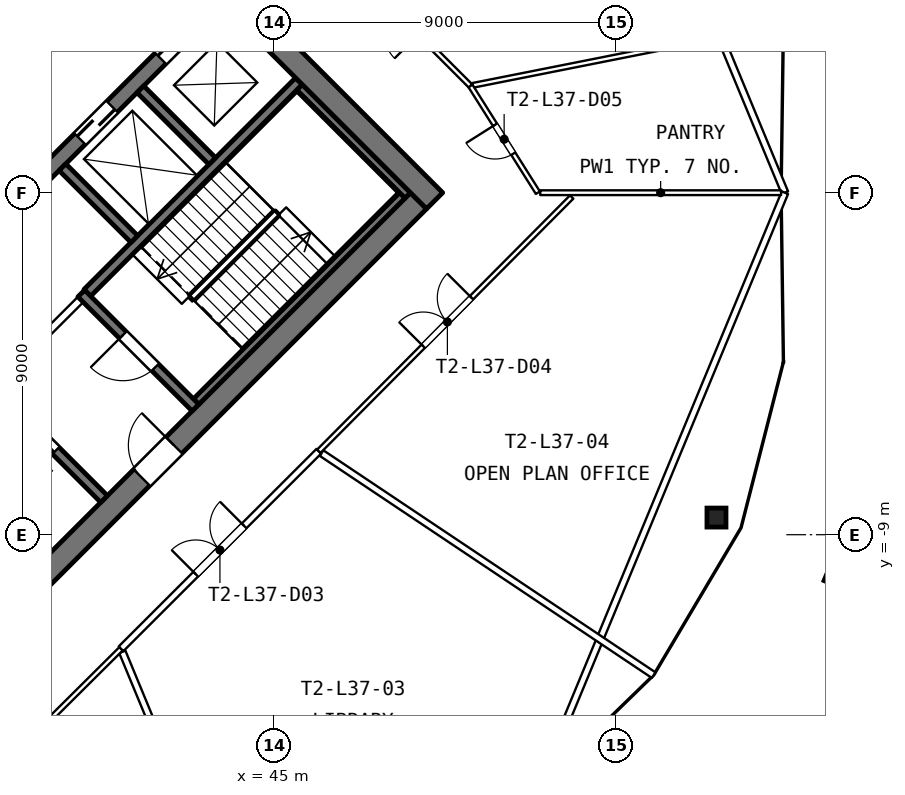
"""IFC4 building model, lengths in metres.
Left out: names, types, materials, properties, quantities, classifications, styles, units other than length and angle.
Written with IfcOpenShell. Run it as: python <this file> out.ifc"""

import sys

from ifc_helpers import new_model, si_unit, direction, frame, frame_2d, origin, origin_2d, place, context, subcontext, project, spatial, rectangle, hollow_rectangle, extrude, element, fill, save


model = new_model("IFC4")
c1 = context("Model", 3, precision=1e-05, world=origin(), true_north=direction((0.0, 1.0)))
c2 = subcontext(c1, "Body", "Model", "MODEL_VIEW")
j1 = project(units=[si_unit("LENGTHUNIT", "METRE"), si_unit("PLANEANGLEUNIT", "RADIAN")], contexts=[c1])
p1 = place(None, origin())
s1 = spatial("IfcSite", under=j1, at=p1, CompositionType="ELEMENT")
p2 = place(p1, origin())
s2 = spatial("IfcBuilding", under=s1, at=p2, CompositionType="ELEMENT")
p3 = place(p2, frame((0.0, 0.0, 130.8)))
s3 = spatial("IfcBuildingStorey", under=s2, at=p3, CompositionType="ELEMENT", Elevation=130.8)
p4 = place(p3, frame((60.575, -10.179, 0.0), z_axis=(-0.018778670571, 0.007786476489, 0.999793344805), x_axis=(-0.707293864185, -0.706876840783, -0.007779566259)))
e1 = element("IfcColumn", 1, at=p4, inside=s3, PredefinedType="COLUMN", context=c2, shape_type="SweptSolid", body=[
    extrude(hollow_rectangle(XDim=0.9, YDim=0.9, WallThickness=0.08, at=origin_2d()), origin(), (0.0, 0.0, 1.0), 30.006),
])
p5 = place(p2, frame((0.0, 0.0, 156.8)))
s4 = spatial("IfcBuildingStorey", under=s2, at=p5, CompositionType="ELEMENT", Elevation=156.8)
p6 = place(p5, frame((56.639, -8.549, 0.0), z_axis=(0.0, 0.0, 1.0), x_axis=(1.0, 0.0, 0.0)))
e2 = element("IfcColumn", 2, at=p6, inside=s4, PredefinedType="COLUMN", context=c2, shape_type="SweptSolid", body=[
    extrude(hollow_rectangle(XDim=0.5, YDim=0.5, WallThickness=0.03, at=origin_2d()), origin(), (0.0, 0.0, 1.0), 3.9),
])
p7 = place(p5, frame((36.212, -12.799, 0.0), z_axis=(0.0, 0.0, 1.0), x_axis=(0.707106781187, 0.707106781187, 0.0)))
e3 = element("IfcWall", 3, at=p7, inside=s4, PredefinedType="SHEAR", context=c2, shape_type="SweptSolid", body=[
    extrude(rectangle(XDim=17.8, YDim=0.6, at=frame_2d((8.9, 0.0))), origin(), (0.0, 0.0, 1.0), 3.7),
])
p8 = place(p7, frame((7.5, 0.0, 0.0)))
e4 = element("IfcOpeningElement", 4, at=p8, cuts=e3, PredefinedType="OPENING", context=c2, shape_type="SweptSolid", body=[
    extrude(rectangle(XDim=1.2, YDim=2.1, at=frame_2d((0.6, 1.05))), frame((0.0, 0.31, 0.0), z_axis=(0.0, -1.0, 0.0), x_axis=(1.0, 0.0, 0.0)), (0.0, 0.0, 1.0), 0.62),
])
p9 = place(p7, frame((0.5, 0.0, 0.0)))
e5 = element("IfcOpeningElement", 5, at=p9, cuts=e3, PredefinedType="OPENING", context=c2, shape_type="SweptSolid", body=[
    extrude(rectangle(XDim=0.9, YDim=2.1, at=frame_2d((0.45, 1.05))), frame((0.0, 0.31, 0.0), z_axis=(0.0, -1.0, 0.0), x_axis=(1.0, 0.0, 0.0)), (0.0, 0.0, 1.0), 0.62),
])
p10 = place(p7, frame((2.0, 0.0, 0.0)))
e6 = element("IfcOpeningElement", 6, at=p10, cuts=e3, PredefinedType="OPENING", context=c2, shape_type="SweptSolid", body=[
    extrude(rectangle(XDim=0.9, YDim=2.1, at=frame_2d((0.45, 1.05))), frame((0.0, 0.31, 0.0), z_axis=(0.0, -1.0, 0.0), x_axis=(1.0, 0.0, 0.0)), (0.0, 0.0, 1.0), 0.62),
])
p11 = place(p5, frame((42.947, -5.498, 0.0), z_axis=(0.0, 0.0, 1.0), x_axis=(0.707122685701, 0.707090876314, 0.0)))
e7 = element("IfcWall", 7, at=p11, inside=s4, PredefinedType="SHEAR", context=c2, shape_type="SweptSolid", body=[
    extrude(rectangle(XDim=7.675, YDim=0.2, at=frame_2d((3.837, 0.0))), origin(), (0.0, 0.0, 1.0), 3.7),
])
p12 = place(p5, frame((37.679, -5.038, 0.0), z_axis=(0.0, 0.0, 1.0), x_axis=(0.707106781187, 0.707106781187, 0.0)))
e8 = element("IfcWall", 8, at=p12, inside=s4, PredefinedType="PARTITIONING", context=c2, shape_type="SweptSolid", body=[
    extrude(rectangle(XDim=3.15, YDim=0.2, at=frame_2d((1.575, 0.0))), origin(), (0.0, 0.0, 1.0), 3.7),
])
p13 = place(p5, frame((40.083, -2.634, 0.0), z_axis=(0.0, 0.0, 1.0), x_axis=(0.707106781187, 0.707106781187, 0.0)))
e9 = element("IfcWall", 9, at=p13, inside=s4, PredefinedType="SHEAR", context=c2, shape_type="SweptSolid", body=[
    extrude(rectangle(XDim=7.875, YDim=0.25, at=frame_2d((3.938, 0.0))), origin(), (0.0, 0.0, 1.0), 3.7),
])
p14 = place(p5, frame((30.944, -7.531, 0.0), z_axis=(0.0, 0.0, 1.0), x_axis=(0.707106781187, 0.707106781187, 0.0)))
e10 = element("IfcWall", 10, at=p14, inside=s4, PredefinedType="SHEAR", context=c2, shape_type="SweptSolid", body=[
    extrude(rectangle(XDim=17.8, YDim=0.4, at=frame_2d((8.9, 0.0))), origin(), (0.0, 0.0, 1.0), 3.7),
])
p15 = place(p14, frame((12.65, 0.0, 0.0)))
e11 = element("IfcOpeningElement", 11, at=p15, cuts=e10, PredefinedType="OPENING", context=c2, shape_type="SweptSolid", body=[
    extrude(rectangle(XDim=1.2, YDim=2.1, at=frame_2d((0.6, 1.05))), frame((0.0, 0.21, 0.0), z_axis=(0.0, -1.0, 0.0), x_axis=(1.0, 0.0, 0.0)), (0.0, 0.0, 1.0), 0.42),
])
p16 = place(p14, frame((15.65, 0.0, 0.0)))
e12 = element("IfcOpeningElement", 12, at=p16, cuts=e10, PredefinedType="OPENING", context=c2, shape_type="SweptSolid", body=[
    extrude(rectangle(XDim=1.1, YDim=2.1, at=frame_2d((0.55, 1.05))), frame((0.0, 0.21, 0.0), z_axis=(0.0, -1.0, 0.0), x_axis=(1.0, 0.0, 0.0)), (0.0, 0.0, 1.0), 0.42),
])
p17 = place(p14, frame((2.45, 0.0, 0.0)))
e13 = element("IfcOpeningElement", 13, at=p17, cuts=e10, PredefinedType="OPENING", context=c2, shape_type="SweptSolid", body=[
    extrude(rectangle(XDim=1.0, YDim=2.1, at=frame_2d((0.5, 1.05))), frame((0.0, 0.21, 0.0), z_axis=(0.0, -1.0, 0.0), x_axis=(1.0, 0.0, 0.0)), (0.0, 0.0, 1.0), 0.42),
])
p18 = place(p14, frame((8.4, 0.0, 0.0)))
e14 = element("IfcOpeningElement", 14, at=p18, cuts=e10, PredefinedType="OPENING", context=c2, shape_type="SweptSolid", body=[
    extrude(rectangle(XDim=1.0, YDim=2.1, at=frame_2d((0.5, 1.05))), frame((0.0, 0.21, 0.0), z_axis=(0.0, -1.0, 0.0), x_axis=(1.0, 0.0, 0.0)), (0.0, 0.0, 1.0), 0.42),
])
p19 = place(p5, frame((28.469, -5.056, 0.0), z_axis=(0.0, 0.0, 1.0), x_axis=(0.707106781187, 0.707106781187, 0.0)))
e15 = element("IfcWall", 15, at=p19, inside=s4, PredefinedType="SHEAR", context=c2, shape_type="SweptSolid", body=[
    extrude(rectangle(XDim=17.8, YDim=0.4, at=frame_2d((8.9, 0.0))), origin(), (0.0, 0.0, 1.0), 3.7),
])
p20 = place(p19, frame((0.4, 0.0, 0.0)))
e16 = element("IfcOpeningElement", 16, at=p20, cuts=e15, PredefinedType="OPENING", context=c2, shape_type="SweptSolid", body=[
    extrude(rectangle(XDim=1.0, YDim=2.1, at=frame_2d((0.5, 1.05))), frame((0.0, 0.21, 0.0), z_axis=(0.0, -1.0, 0.0), x_axis=(1.0, 0.0, 0.0)), (0.0, 0.0, 1.0), 0.42),
])
p21 = place(p19, frame((2.55, 0.0, 0.0)))
e17 = element("IfcOpeningElement", 17, at=p21, cuts=e15, PredefinedType="OPENING", context=c2, shape_type="SweptSolid", body=[
    extrude(rectangle(XDim=1.1, YDim=2.1, at=frame_2d((0.55, 1.05))), frame((0.0, 0.21, 0.0), z_axis=(0.0, -1.0, 0.0), x_axis=(1.0, 0.0, 0.0)), (0.0, 0.0, 1.0), 0.42),
])
p22 = place(p19, frame((5.45, 0.0, 0.0)))
e18 = element("IfcOpeningElement", 18, at=p22, cuts=e15, PredefinedType="OPENING", context=c2, shape_type="SweptSolid", body=[
    extrude(rectangle(XDim=1.1, YDim=2.1, at=frame_2d((0.55, 1.05))), frame((0.0, 0.21, 0.0), z_axis=(0.0, -1.0, 0.0), x_axis=(1.0, 0.0, 0.0)), (0.0, 0.0, 1.0), 0.42),
])
p23 = place(p19, frame((8.35, 0.0, 0.0)))
e19 = element("IfcOpeningElement", 19, at=p23, cuts=e15, PredefinedType="OPENING", context=c2, shape_type="SweptSolid", body=[
    extrude(rectangle(XDim=1.1, YDim=2.1, at=frame_2d((0.55, 1.05))), frame((0.0, 0.21, 0.0), z_axis=(0.0, -1.0, 0.0), x_axis=(1.0, 0.0, 0.0)), (0.0, 0.0, 1.0), 0.42),
])
p24 = place(p19, frame((11.25, 0.0, 0.0)))
e20 = element("IfcOpeningElement", 20, at=p24, cuts=e15, PredefinedType="OPENING", context=c2, shape_type="SweptSolid", body=[
    extrude(rectangle(XDim=1.1, YDim=2.1, at=frame_2d((0.55, 1.05))), frame((0.0, 0.21, 0.0), z_axis=(0.0, -1.0, 0.0), x_axis=(1.0, 0.0, 0.0)), (0.0, 0.0, 1.0), 0.42),
])
p25 = place(p19, frame((14.15, 0.0, 0.0)))
e21 = element("IfcOpeningElement", 21, at=p25, cuts=e15, PredefinedType="OPENING", context=c2, shape_type="SweptSolid", body=[
    extrude(rectangle(XDim=1.1, YDim=2.1, at=frame_2d((0.55, 1.05))), frame((0.0, 0.21, 0.0), z_axis=(0.0, -1.0, 0.0), x_axis=(1.0, 0.0, 0.0)), (0.0, 0.0, 1.0), 0.42),
])
p26 = place(p19, frame((16.4, 0.0, 0.0)))
e22 = element("IfcOpeningElement", 22, at=p26, cuts=e15, PredefinedType="OPENING", context=c2, shape_type="SweptSolid", body=[
    extrude(rectangle(XDim=1.0, YDim=2.1, at=frame_2d((0.5, 1.05))), frame((0.0, 0.21, 0.0), z_axis=(0.0, -1.0, 0.0), x_axis=(1.0, 0.0, 0.0)), (0.0, 0.0, 1.0), 0.42),
])
p27 = place(p5, frame((40.525, -8.061, 0.0), z_axis=(0.0, 0.0, 1.0), x_axis=(-0.707078225638, 0.707135335582, 0.0)))
e23 = element("IfcWall", 23, at=p27, inside=s4, PredefinedType="SHEAR", context=c2, shape_type="SweptSolid", body=[
    extrude(rectangle(XDim=4.275, YDim=0.25, at=frame_2d((2.137, 0.0))), origin(), (0.0, 0.0, 1.0), 3.7),
])
p28 = place(p27, frame((1.8, 0.0, 0.0)))
e24 = element("IfcOpeningElement", 24, at=p28, cuts=e23, PredefinedType="OPENING", context=c2, shape_type="SweptSolid", body=[
    extrude(rectangle(XDim=1.2, YDim=2.1, at=frame_2d((0.6, 1.05))), frame((0.0, 0.135, 0.0), z_axis=(0.0, -1.0, 0.0), x_axis=(1.0, 0.0, 0.0)), (0.0, 0.0, 1.0), 0.27),
])
p29 = place(p5, frame((42.93, -5.657, 0.0), z_axis=(0.0, 0.0, 1.0), x_axis=(-0.707106781187, 0.707106781187, 0.0)))
e25 = element("IfcWall", 25, at=p29, inside=s4, PredefinedType="SHEAR", context=c2, shape_type="SweptSolid", body=[
    extrude(rectangle(XDim=4.25, YDim=0.25, at=frame_2d((2.125, 0.0))), origin(), (0.0, 0.0, 1.0), 3.7),
])
p30 = place(p29, frame((1.5, 0.0, 0.0)))
e26 = element("IfcOpeningElement", 26, at=p30, cuts=e25, PredefinedType="OPENING", context=c2, shape_type="SweptSolid", body=[
    extrude(rectangle(XDim=1.2, YDim=2.1, at=frame_2d((0.6, 1.05))), frame((0.0, 0.135, 0.0), z_axis=(0.0, -1.0, 0.0), x_axis=(1.0, 0.0, 0.0)), (0.0, 0.0, 1.0), 0.27),
])
for number, where, z_axis, x_axis in (
    (27, (41.321, -1.22, 0.0), (0.0, 0.0, 1.0), (-0.707, 0.707, 0.0)),
    (28, (43.372, 0.831, 0.0), (0.0, 0.0, 1.0), (-0.707, 0.707, 0.0)),
):
    element("IfcWall", number, at=place(p5, frame(where, z_axis=z_axis, x_axis=x_axis)), inside=s4, PredefinedType="SHEAR", context=c2, shape_type="SweptSolid", body=[
        extrude(rectangle(XDim=2.675, YDim=0.25, at=frame_2d((1.337, 0.0))), origin(), (0.0, 0.0, 1.0), 3.7),
    ])
p31 = place(p5, frame((48.516, -0.071, 0.0), z_axis=(0.0, 0.0, 1.0), x_axis=(-0.707106781187, 0.707106781187, 0.0)))
e29 = element("IfcWall", 29, at=p31, inside=s4, PredefinedType="SHEAR", context=c2, shape_type="SweptSolid", body=[
    extrude(rectangle(XDim=4.025, YDim=0.2, at=frame_2d((2.013, 0.0))), origin(), (0.0, 0.0, 1.0), 3.7),
])
p32 = place(p5, frame((49.223, -0.212, 0.0), z_axis=(0.0, 0.0, 1.0), x_axis=(-0.707106781187, 0.707106781187, 0.0)))
e30 = element("IfcWall", 30, at=p32, inside=s4, PredefinedType="SHEAR", context=c2, shape_type="SweptSolid", body=[
    extrude(rectangle(XDim=19.0, YDim=0.6, at=frame_2d((9.5, 0.0))), origin(), (0.0, 0.0, 1.0), 3.7),
])
p33 = place(p32, frame((8.3, 0.0, 0.0)))
e31 = element("IfcOpeningElement", 31, at=p33, cuts=e30, PredefinedType="OPENING", context=c2, shape_type="SweptSolid", body=[
    extrude(rectangle(XDim=2.4, YDim=2.1, at=frame_2d((1.2, 1.05))), frame((0.0, 0.31, 0.0), z_axis=(0.0, -1.0, 0.0), x_axis=(1.0, 0.0, 0.0)), (0.0, 0.0, 1.0), 0.62),
])
p34 = place(p5, frame((58.339, 0.0, 0.0), z_axis=(0.0, 0.0, 1.0), x_axis=(-1.0, 0.0, 0.0)))
e32 = element("IfcWall", 32, at=p34, inside=s4, PredefinedType="PARTITIONING", context=c2, shape_type="SweptSolid", body=[
    extrude(rectangle(XDim=6.337, YDim=0.125, at=frame_2d((3.168, 0.0))), origin(), (0.0, 0.0, 1.0), 2.2),
])
p35 = place(p5, frame((58.402, 4.448, 0.0), z_axis=(0.0, 0.0, 1.0), x_axis=(-0.980857909124, -0.194724836909, 0.0)))
e33 = element("IfcWall", 33, at=p35, inside=s4, PredefinedType="PARTITIONING", context=c2, shape_type="SweptSolid", body=[
    extrude(rectangle(XDim=8.336, YDim=0.125, at=frame_2d((4.168, 0.0))), origin(), (0.0, 0.0, 1.0), 2.2),
])
p36 = place(p5, frame((44.817, -21.286, 0.0), z_axis=(0.0, 0.0, 1.0), x_axis=(-0.38267936462, 0.923881217416, 0.0)))
e34 = element("IfcWall", 34, at=p36, inside=s4, PredefinedType="PARTITIONING", context=c2, shape_type="SweptSolid", body=[
    extrude(rectangle(XDim=9.961, YDim=0.175, at=frame_2d((4.981, 0.0))), origin(), (0.0, 0.0, 1.0), 2.2),
])
p37 = place(p5, frame((54.986, -12.696, 0.0), z_axis=(0.0, 0.0, 1.0), x_axis=(-0.831274097515, 0.555862730178, 0.0)))
e35 = element("IfcWall", 35, at=p37, inside=s4, PredefinedType="PARTITIONING", context=c2, shape_type="SweptSolid", body=[
    extrude(rectangle(XDim=10.512, YDim=0.175, at=frame_2d((5.256, 0.0))), origin(), (0.0, 0.0, 1.0), 2.2),
])
p38 = place(p5, frame((36.0, -16.942, 0.0), z_axis=(0.0, 0.0, 1.0), x_axis=(0.709332667605, 0.704873865786, 0.0)))
e36 = element("IfcWall", 36, at=p38, inside=s4, PredefinedType="PARTITIONING", context=c2, shape_type="SweptSolid", body=[
    extrude(rectangle(XDim=7.009, YDim=0.125, at=frame_2d((3.504, 0.0))), origin(), (0.0, 0.0, 1.0), 2.5),
])
p39 = place(p5, frame((40.971, -12.002, 0.0), z_axis=(0.0, 0.0, 1.0), x_axis=(0.707488386649, 0.706724969671, 0.0)))
e37 = element("IfcWall", 37, at=p39, inside=s4, PredefinedType="PARTITIONING", context=c2, shape_type="SweptSolid", body=[
    extrude(rectangle(XDim=7.355, YDim=0.175, at=frame_2d((3.678, 0.0))), origin(), (0.0, 0.0, 1.0), 2.5),
])
p40 = place(p39, frame((2.778, 0.0, 0.0)))
e38 = element("IfcOpeningElement", 38, at=p40, cuts=e37, PredefinedType="OPENING", context=c2, shape_type="SweptSolid", body=[
    extrude(rectangle(XDim=1.8, YDim=2.1, at=frame_2d((0.9, 1.05))), frame((0.0, 0.098, 0.0), z_axis=(0.0, -1.0, 0.0), x_axis=(1.0, 0.0, 0.0)), (0.0, 0.0, 1.0), 0.195),
])
p41 = place(p5, frame((46.175, -6.804, 0.0), z_axis=(0.0, 0.0, 1.0), x_axis=(0.705176522901, 0.709031784584, 0.0)))
e39 = element("IfcWall", 39, at=p41, inside=s4, PredefinedType="PARTITIONING", context=c2, shape_type="SweptSolid", body=[
    extrude(rectangle(XDim=9.436, YDim=0.125, at=frame_2d((4.718, 0.0))), origin(), (0.0, 0.0, 1.0), 2.5),
])
p42 = place(p41, frame((3.898, 0.0, 0.0)))
e40 = element("IfcOpeningElement", 40, at=p42, cuts=e39, PredefinedType="OPENING", context=c2, shape_type="SweptSolid", body=[
    extrude(rectangle(XDim=1.8, YDim=2.1, at=frame_2d((0.9, 1.05))), frame((0.0, 0.073, 0.0), z_axis=(0.0, -1.0, 0.0), x_axis=(1.0, 0.0, 0.0)), (0.0, 0.0, 1.0), 0.145),
])
p43 = place(p5, frame((51.94, 0.0, 0.0), z_axis=(0.0, 0.0, 1.0), x_axis=(-0.533899096433, 0.845548197815, 0.0)))
e41 = element("IfcWall", 41, at=p43, inside=s4, PredefinedType="PARTITIONING", context=c2, shape_type="SweptSolid", body=[
    extrude(rectangle(XDim=3.326, YDim=0.125, at=frame_2d((1.663, 0.0))), origin(), (0.0, 0.0, 1.0), 3.7),
])
p44 = place(p43, frame((1.213, 0.0, 0.0)))
e42 = element("IfcOpeningElement", 42, at=p44, cuts=e41, PredefinedType="OPENING", context=c2, shape_type="SweptSolid", body=[
    extrude(rectangle(XDim=0.9, YDim=2.1, at=frame_2d((0.45, 1.05))), frame((0.0, 0.073, 0.0), z_axis=(0.0, -1.0, 0.0), x_axis=(1.0, 0.0, 0.0)), (0.0, 0.0, 1.0), 0.145),
])
p45 = place(p5, frame((50.164, 2.812, 0.0), z_axis=(0.0, 0.0, 1.0), x_axis=(-0.706868781892, 0.707344700401, 0.0)))
e43 = element("IfcWall", 43, at=p45, inside=s4, PredefinedType="PARTITIONING", context=c2, shape_type="SweptSolid", body=[
    extrude(rectangle(XDim=5.643, YDim=0.125, at=frame_2d((2.821, 0.0))), origin(), (0.0, 0.0, 1.0), 2.5),
])
p46 = place(p45, frame((1.921, 0.0, 0.0)))
e44 = element("IfcOpeningElement", 44, at=p46, cuts=e43, PredefinedType="OPENING", context=c2, shape_type="SweptSolid", body=[
    extrude(rectangle(XDim=1.8, YDim=2.1, at=frame_2d((0.9, 1.05))), frame((0.0, 0.073, 0.0), z_axis=(0.0, -1.0, 0.0), x_axis=(1.0, 0.0, 0.0)), (0.0, 0.0, 1.0), 0.145),
])
p47 = place(p15, origin())
e45 = element("IfcDoor", 45, at=p47, inside=s4, OperationType="SLIDING_TO_LEFT", PredefinedType="DOOR", context=c2, shape_type="SweptSolid", body=[
    extrude(rectangle(XDim=1.2, YDim=2.1, at=frame_2d((0.6, 1.05))), frame((0.0, 0.025, 0.0), z_axis=(0.0, -1.0, 0.0), x_axis=(1.0, 0.0, 0.0)), (0.0, 0.0, 1.0), 0.05),
])
fill(e11, e45)
p48 = place(p16, origin())
e46 = element("IfcDoor", 46, at=p48, inside=s4, OperationType="SLIDING_TO_LEFT", PredefinedType="DOOR", context=c2, shape_type="SweptSolid", body=[
    extrude(rectangle(XDim=1.1, YDim=2.1, at=frame_2d((0.55, 1.05))), frame((0.0, 0.025, 0.0), z_axis=(0.0, -1.0, 0.0), x_axis=(1.0, 0.0, 0.0)), (0.0, 0.0, 1.0), 0.05),
])
fill(e12, e46)
p49 = place(p28, origin())
e47 = element("IfcDoor", 47, at=p49, inside=s4, OperationType="SLIDING_TO_LEFT", PredefinedType="DOOR", context=c2, shape_type="SweptSolid", body=[
    extrude(rectangle(XDim=1.2, YDim=2.1, at=frame_2d((0.6, 1.05))), frame((0.0, 0.025, 0.0), z_axis=(0.0, -1.0, 0.0), x_axis=(1.0, 0.0, 0.0)), (0.0, 0.0, 1.0), 0.05),
])
fill(e24, e47)
p50 = place(p30, origin())
e48 = element("IfcDoor", 48, at=p50, inside=s4, OperationType="SINGLE_SWING_RIGHT", PredefinedType="DOOR", context=c2, shape_type="SweptSolid", body=[
    extrude(rectangle(XDim=1.2, YDim=2.1, at=frame_2d((0.6, 1.05))), frame((0.0, 0.025, 0.0), z_axis=(0.0, -1.0, 0.0), x_axis=(1.0, 0.0, 0.0)), (0.0, 0.0, 1.0), 0.05),
])
fill(e26, e48)
p51 = place(p8, origin())
e49 = element("IfcDoor", 49, at=p51, inside=s4, OperationType="SINGLE_SWING_RIGHT", PredefinedType="DOOR", context=c2, shape_type="SweptSolid", body=[
    extrude(rectangle(XDim=1.2, YDim=2.1, at=frame_2d((0.6, 1.05))), frame((0.0, 0.175, 0.0), z_axis=(0.0, -1.0, 0.0), x_axis=(1.0, 0.0, 0.0)), (0.0, 0.0, 1.0), 0.05),
])
fill(e4, e49)
p52 = place(p40, origin())
e50 = element("IfcDoor", 50, at=p52, inside=s4, OperationType="DOUBLE_DOOR_DOUBLE_SWING", PredefinedType="DOOR", context=c2, shape_type="SweptSolid", body=[
    extrude(rectangle(XDim=1.8, YDim=2.1, at=frame_2d((0.9, 1.05))), frame((0.0, 0.025, 0.0), z_axis=(0.0, -1.0, 0.0), x_axis=(1.0, 0.0, 0.0)), (0.0, 0.0, 1.0), 0.05),
])
fill(e38, e50)
p53 = place(p42, origin())
e51 = element("IfcDoor", 51, at=p53, inside=s4, OperationType="DOUBLE_DOOR_DOUBLE_SWING", PredefinedType="DOOR", context=c2, shape_type="SweptSolid", body=[
    extrude(rectangle(XDim=1.8, YDim=2.1, at=frame_2d((0.9, 1.05))), frame((0.0, 0.025, 0.0), z_axis=(0.0, -1.0, 0.0), x_axis=(1.0, 0.0, 0.0)), (0.0, 0.0, 1.0), 0.05),
])
fill(e40, e51)
p54 = place(p44, origin())
e52 = element("IfcDoor", 52, at=p54, inside=s4, OperationType="SINGLE_SWING_RIGHT", PredefinedType="DOOR", context=c2, shape_type="SweptSolid", body=[
    extrude(rectangle(XDim=0.9, YDim=2.1, at=frame_2d((0.45, 1.05))), frame((0.0, 0.025, 0.0), z_axis=(0.0, -1.0, 0.0), x_axis=(1.0, 0.0, 0.0)), (0.0, 0.0, 1.0), 0.05),
])
fill(e42, e52)
save(model, sys.argv[1])
